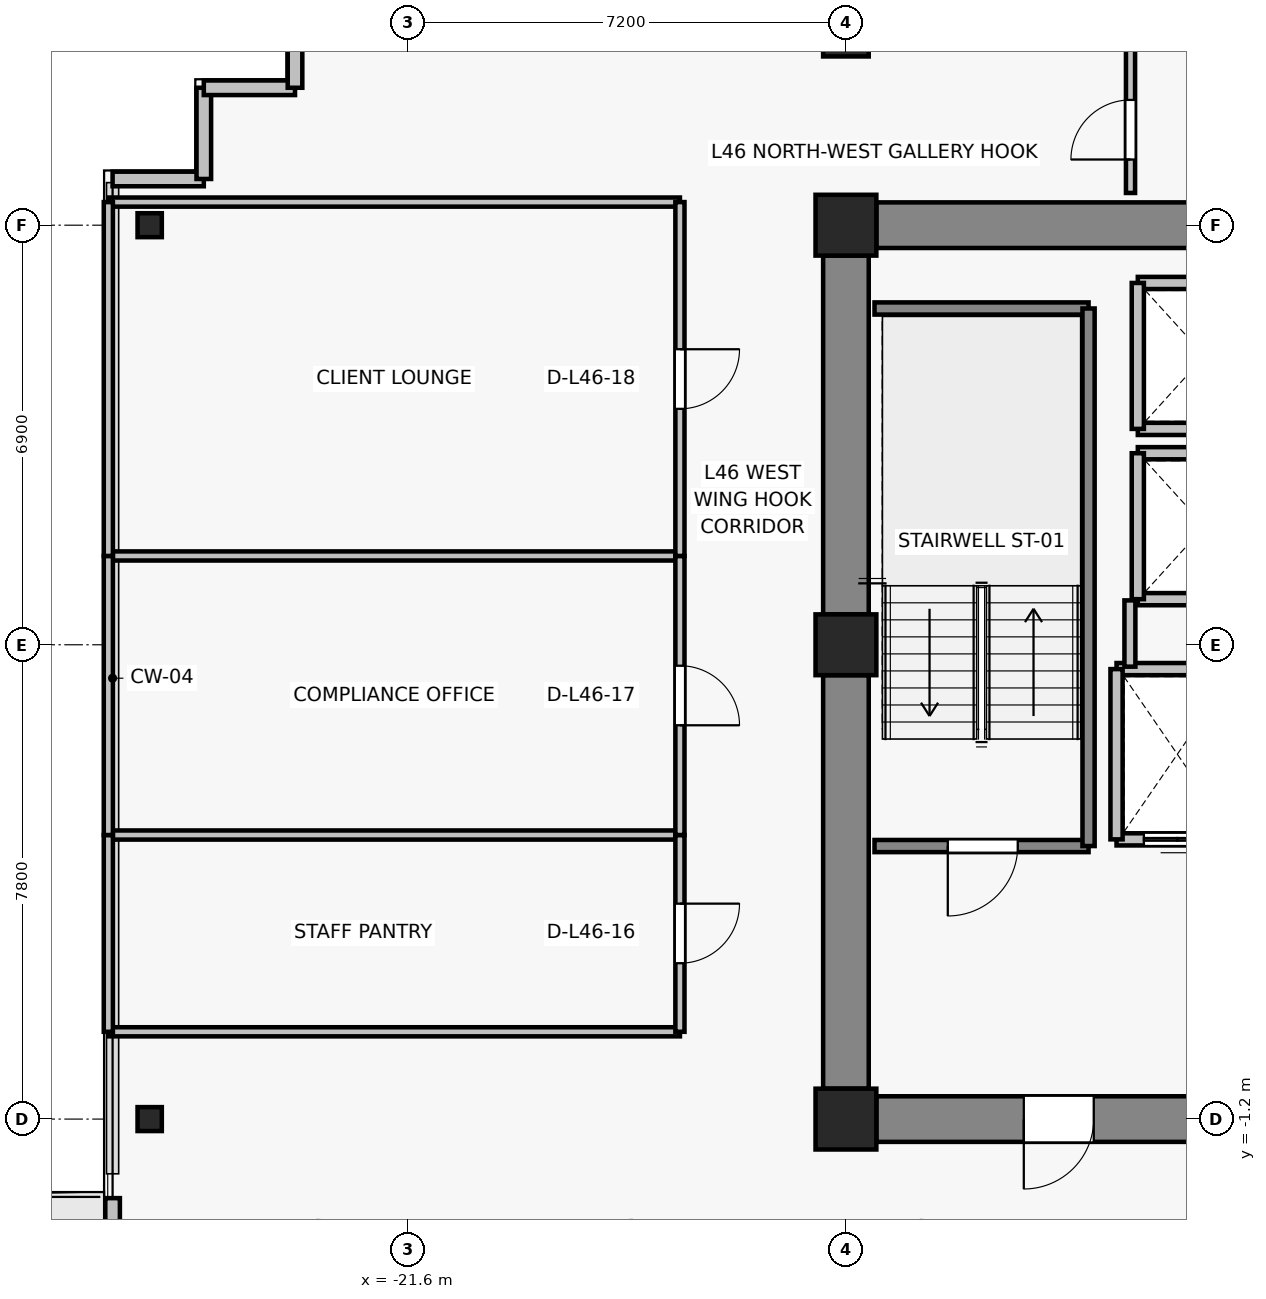
"""IFC4 building model, lengths in metres.
Left out: names, types, materials, properties, quantities, classifications, styles, units other than length and angle.
Written with IfcOpenShell. Run it as: python <this file> out.ifc"""

import sys

from ifc_helpers import new_model, si_unit, direction, frame, frame_2d, origin, origin_2d, place, context, subcontext, project, spatial, rectangle, i_section, extrude, source, transform, mapped, element, fill, save


model = new_model("IFC4")
c1 = context("Model", 3, precision=1e-05, world=origin(), true_north=direction((0.0, 1.0)))
c2 = subcontext(c1, "Body", "Model", "MODEL_VIEW")
j1 = project(units=[si_unit("LENGTHUNIT", "METRE"), si_unit("PLANEANGLEUNIT", "RADIAN")], contexts=[c1])
p1 = place(None, origin())
s1 = spatial("IfcSite", under=j1, at=p1, CompositionType="ELEMENT")
p2 = place(p1, origin())
s2 = spatial("IfcBuilding", under=s1, at=p2, CompositionType="ELEMENT")
p3 = place(p2, frame((0.0, 0.0, 166.0)))
s3 = spatial("IfcBuildingStorey", under=s2, at=p3, CompositionType="ELEMENT", Elevation=166.0)
for number, where, z_axis, x_axis in (
    (1, (-14.4, -1.2, 0.0), (0.0, 0.0, 1.0), (1.0, 0.0, 0.0)),
    (2, (-14.4, 6.6, 0.0), (0.0, 0.0, 1.0), (1.0, 0.0, 0.0)),
    (3, (-14.4, 13.5, 0.0), (0.0, 0.0, 1.0), (1.0, 0.0, 0.0)),
):
    element("IfcColumn", number, at=place(p3, frame(where, z_axis=z_axis, x_axis=x_axis)), inside=s3, PredefinedType="COLUMN", context=c2, shape_type="SweptSolid", body=[
        extrude(rectangle(XDim=1.0, YDim=1.0, at=origin_2d()), origin(), (0.0, 0.0, 1.0), 3.3),
    ])
p4 = place(p3, frame((-14.4, 16.65, 0.0), z_axis=(0.0, 0.0, 1.0), x_axis=(1.0, 0.0, 0.0)))
e4 = element("IfcColumn", 4, at=p4, inside=s3, PredefinedType="COLUMN", context=c2, shape_type="SweptSolid", body=[
    extrude(rectangle(XDim=0.75, YDim=0.75, at=origin_2d()), origin(), (0.0, 0.0, 1.0), 3.3),
])
for number, where, z_axis, x_axis in (
    (5, (-25.85, -1.2, 0.0), (0.0, 0.0, 1.0), (1.0, 0.0, 0.0)),
    (6, (-25.85, 13.5, 0.0), (0.0, 0.0, 1.0), (1.0, 0.0, 0.0)),
):
    element("IfcColumn", number, at=place(p3, frame(where, z_axis=z_axis, x_axis=x_axis)), inside=s3, PredefinedType="COLUMN", context=c2, shape_type="SweptSolid", body=[
        extrude(i_section(OverallWidth=0.399, OverallDepth=0.394, WebThickness=0.023, FlangeThickness=0.037, FilletRadius=0.015, at=origin_2d()), origin(), (0.0, 0.0, 1.0), 3.3),
    ])
p5 = place(p3, frame((-13.9, 13.5, 0.0), z_axis=(0.0, 0.0, 1.0), x_axis=(1.0, 0.0, 0.0)))
e7 = element("IfcWall", 7, at=p5, inside=s3, PredefinedType="SHEAR", context=c2, shape_type="SweptSolid", body=[
    extrude(rectangle(XDim=6.2, YDim=0.75, at=frame_2d((3.1, 0.0))), origin(), (0.0, 0.0, 1.0), 3.075),
])
p6 = place(p3, frame((-14.4, -0.7, 0.0), z_axis=(0.0, 0.0, 1.0), x_axis=(0.0, 1.0, 0.0)))
e8 = element("IfcWall", 8, at=p6, inside=s3, PredefinedType="SHEAR", context=c2, shape_type="SweptSolid", body=[
    extrude(rectangle(XDim=6.8, YDim=0.75, at=frame_2d((3.4, 0.0))), origin(), (0.0, 0.0, 1.0), 3.075),
])
p7 = place(p3, frame((-14.4, 7.1, 0.0), z_axis=(0.0, 0.0, 1.0), x_axis=(0.0, 1.0, 0.0)))
e9 = element("IfcWall", 9, at=p7, inside=s3, PredefinedType="SHEAR", context=c2, shape_type="SweptSolid", body=[
    extrude(rectangle(XDim=5.9, YDim=0.75, at=frame_2d((2.95, 0.0))), origin(), (0.0, 0.0, 1.0), 3.075),
])
p8 = place(p3, frame((-7.7, -1.2, 0.0), z_axis=(0.0, 0.0, 1.0), x_axis=(-1.0, 0.0, 0.0)))
e10 = element("IfcWall", 10, at=p8, inside=s3, PredefinedType="SHEAR", context=c2, shape_type="SweptSolid", body=[
    extrude(rectangle(XDim=6.2, YDim=0.75, at=frame_2d((3.1, 0.0))), origin(), (0.0, 0.0, 1.0), 3.075),
])
p9 = place(p8, frame((2.625, 0.0, 0.0)))
e11 = element("IfcOpeningElement", 11, at=p9, cuts=e10, PredefinedType="OPENING", context=c2, shape_type="SweptSolid", body=[
    extrude(rectangle(XDim=1.15, YDim=2.15, at=frame_2d((0.575, 1.075))), frame((0.0, 0.385, 0.0), z_axis=(0.0, -1.0, 0.0), x_axis=(1.0, 0.0, 0.0)), (0.0, 0.0, 1.0), 0.77),
])
p10 = place(p3, frame((-26.46, -8.3, 0.0), z_axis=(0.0, 0.0, 1.0), x_axis=(0.0, 1.0, 0.0)))
e12 = element("IfcWall", 12, at=p10, inside=s3, PredefinedType="SOLIDWALL", context=c2, shape_type="SweptSolid", body=[
    extrude(rectangle(XDim=5.8, YDim=0.24, at=frame_2d((2.9, 0.0))), origin(), (0.0, 0.0, 1.0), 3.075),
])
p11 = place(p10, frame((1.218, 0.0, 0.0)))
e13 = element("IfcOpeningElement", 13, at=p11, cuts=e12, PredefinedType="OPENING", context=c2, shape_type="SweptSolid", body=[
    extrude(rectangle(XDim=1.0, YDim=2.2, at=frame_2d((0.5, 1.1))), frame((0.0, 0.13, 0.0), z_axis=(0.0, -1.0, 0.0), x_axis=(1.0, 0.0, 0.0)), (0.0, 0.0, 1.0), 0.26),
])
p12 = place(p10, frame((2.568, 0.0, 0.85)))
e14 = element("IfcOpeningElement", 14, at=p12, cuts=e12, PredefinedType="OPENING", context=c2, shape_type="SweptSolid", body=[
    extrude(rectangle(XDim=1.2, YDim=1.5, at=frame_2d((0.6, 0.75))), frame((0.0, 0.13, 0.0), z_axis=(0.0, -1.0, 0.0), x_axis=(1.0, 0.0, 0.0)), (0.0, 0.0, 1.0), 0.26),
])
for number, where, z_axis, x_axis in (
    (15, (-24.96, 14.26, 0.0), (0.0, 0.0, 1.0), (-1.0, 0.0, 0.0)),
    (16, (-24.96, 15.76, 0.0), (0.0, 0.0, 1.0), (0.0, -1.0, 0.0)),
    (17, (-23.46, 15.76, 0.0), (0.0, 0.0, 1.0), (-1.0, 0.0, 0.0)),
    (18, (-23.46, 17.26, 0.0), (0.0, 0.0, 1.0), (0.0, -1.0, 0.0)),
):
    element("IfcWall", number, at=place(p3, frame(where, z_axis=z_axis, x_axis=x_axis)), inside=s3, PredefinedType="SOLIDWALL", context=c2, shape_type="SweptSolid", body=[
        extrude(rectangle(XDim=1.5, YDim=0.24, at=frame_2d((0.75, 0.0))), origin(), (0.0, 0.0, 1.0), 3.075),
    ])
p13 = place(p3, frame((-7.95, 3.4, 0.0), z_axis=(0.0, 0.0, 1.0), x_axis=(-1.0, 0.0, 0.0)))
e19 = element("IfcWall", 19, at=p13, inside=s3, PredefinedType="SOLIDWALL", context=c2, shape_type="SweptSolid", body=[
    extrude(rectangle(XDim=2.0, YDim=0.2, at=frame_2d((1.0, 0.0))), origin(), (0.0, 0.0, 1.0), 3.075),
])
p14 = place(p13, frame((0.45, 0.0, 0.0)))
e20 = element("IfcOpeningElement", 20, at=p14, cuts=e19, PredefinedType="OPENING", context=c2, shape_type="SweptSolid", body=[
    extrude(rectangle(XDim=1.1, YDim=2.2, at=frame_2d((0.55, 1.1))), frame((0.0, 0.11, 0.0), z_axis=(0.0, -1.0, 0.0), x_axis=(1.0, 0.0, 0.0)), (0.0, 0.0, 1.0), 0.22),
])
p15 = place(p3, frame((-9.95, 6.2, 0.0), z_axis=(0.0, 0.0, 1.0), x_axis=(1.0, 0.0, 0.0)))
e21 = element("IfcWall", 21, at=p15, inside=s3, PredefinedType="SOLIDWALL", context=c2, shape_type="SweptSolid", body=[
    extrude(rectangle(XDim=2.0, YDim=0.2, at=frame_2d((1.0, 0.0))), origin(), (0.0, 0.0, 1.0), 3.075),
])
p16 = place(p3, frame((-9.95, 3.4, 0.0), z_axis=(0.0, 0.0, 1.0), x_axis=(0.0, 1.0, 0.0)))
e22 = element("IfcWall", 22, at=p16, inside=s3, PredefinedType="SOLIDWALL", context=c2, shape_type="SweptSolid", body=[
    extrude(rectangle(XDim=2.8, YDim=0.2, at=frame_2d((1.4, 0.0))), origin(), (0.0, 0.0, 1.0), 3.075),
])
for number, where, z_axis, x_axis in (
    (23, (-7.4, 7.35, 0.0), (0.0, 0.0, 1.0), (-1.0, 0.0, 0.0)),
    (24, (-9.6, 9.75, 0.0), (0.0, 0.0, 1.0), (1.0, 0.0, 0.0)),
):
    element("IfcWall", number, at=place(p3, frame(where, z_axis=z_axis, x_axis=x_axis)), inside=s3, PredefinedType="SOLIDWALL", context=c2, shape_type="SweptSolid", body=[
        extrude(rectangle(XDim=2.2, YDim=0.2, at=frame_2d((1.1, 0.0))), origin(), (0.0, 0.0, 1.0), 2.565),
    ])
p17 = place(p3, frame((-9.6, 7.35, 0.0), z_axis=(0.0, 0.0, 1.0), x_axis=(0.0, 1.0, 0.0)))
e25 = element("IfcWall", 25, at=p17, inside=s3, PredefinedType="SOLIDWALL", context=c2, shape_type="SweptSolid", body=[
    extrude(rectangle(XDim=2.4, YDim=0.2, at=frame_2d((1.2, 0.0))), origin(), (0.0, 0.0, 1.0), 3.075),
])
for number, where, z_axis, x_axis in (
    (26, (-7.4, 10.15, 0.0), (0.0, 0.0, 1.0), (-1.0, 0.0, 0.0)),
    (27, (-9.6, 12.55, 0.0), (0.0, 0.0, 1.0), (1.0, 0.0, 0.0)),
):
    element("IfcWall", number, at=place(p3, frame(where, z_axis=z_axis, x_axis=x_axis)), inside=s3, PredefinedType="SOLIDWALL", context=c2, shape_type="SweptSolid", body=[
        extrude(rectangle(XDim=2.2, YDim=0.2, at=frame_2d((1.1, 0.0))), origin(), (0.0, 0.0, 1.0), 2.565),
    ])
p18 = place(p3, frame((-9.6, 10.15, 0.0), z_axis=(0.0, 0.0, 1.0), x_axis=(0.0, 1.0, 0.0)))
e28 = element("IfcWall", 28, at=p18, inside=s3, PredefinedType="SOLIDWALL", context=c2, shape_type="SweptSolid", body=[
    extrude(rectangle(XDim=2.4, YDim=0.2, at=frame_2d((1.2, 0.0))), origin(), (0.0, 0.0, 1.0), 3.075),
])
p19 = place(p3, frame((-10.41, 3.29, 0.0), z_axis=(0.0, 0.0, 1.0), x_axis=(-1.0, 0.0, 0.0)))
e29 = element("IfcWall", 29, at=p19, inside=s3, PredefinedType="SOLIDWALL", context=c2, shape_type="SweptSolid", body=[
    extrude(rectangle(XDim=3.52, YDim=0.2, at=frame_2d((1.76, 0.0))), origin(), (0.0, 0.0, 1.0), 3.075),
])
p20 = place(p19, frame((1.165, 0.0, 0.0)))
e30 = element("IfcOpeningElement", 30, at=p20, cuts=e29, PredefinedType="OPENING", context=c2, shape_type="SweptSolid", body=[
    extrude(rectangle(XDim=1.15, YDim=2.15, at=frame_2d((0.575, 1.075))), frame((0.0, 0.11, 0.0), z_axis=(0.0, -1.0, 0.0), x_axis=(1.0, 0.0, 0.0)), (0.0, 0.0, 1.0), 0.22),
])
p21 = place(p3, frame((-13.93, 12.13, 0.0), z_axis=(0.0, 0.0, 1.0), x_axis=(1.0, 0.0, 0.0)))
e31 = element("IfcWall", 31, at=p21, inside=s3, PredefinedType="SOLIDWALL", context=c2, shape_type="SweptSolid", body=[
    extrude(rectangle(XDim=3.52, YDim=0.2, at=frame_2d((1.76, 0.0))), origin(), (0.0, 0.0, 1.0), 3.075),
])
p22 = place(p3, frame((-10.41, 12.13, 0.0), z_axis=(0.0, 0.0, 1.0), x_axis=(0.0, -1.0, 0.0)))
e32 = element("IfcWall", 32, at=p22, inside=s3, PredefinedType="SOLIDWALL", context=c2, shape_type="SweptSolid", body=[
    extrude(rectangle(XDim=8.84, YDim=0.2, at=frame_2d((4.42, 0.0))), origin(), (0.0, 0.0, 1.0), 3.075),
])
p23 = place(p3, frame((-9.73, 6.24, 0.0), z_axis=(0.0, 0.0, 1.0), x_axis=(0.0, 1.0, 0.0)))
e33 = element("IfcWall", 33, at=p23, inside=s3, PredefinedType="PARTITIONING", context=c2, shape_type="SweptSolid", body=[
    extrude(rectangle(XDim=1.09, YDim=0.18, at=frame_2d((0.545, 0.0))), origin(), (0.0, 0.0, 1.0), 3.075),
])
for number, where, z_axis, x_axis in (
    (34, (-17.13, 0.236, 0.0), (0.0, 0.0, 1.0), (-1.0, 0.0, 0.0)),
    (35, (-26.53, 3.471, 0.0), (0.0, 0.0, 1.0), (1.0, 0.0, 0.0)),
):
    element("IfcWall", number, at=place(p3, frame(where, z_axis=z_axis, x_axis=x_axis)), inside=s3, PredefinedType="PARTITIONING", context=c2, shape_type="SweptSolid", body=[
        extrude(rectangle(XDim=9.4, YDim=0.15, at=frame_2d((4.7, 0.0))), origin(), (0.0, 0.0, 1.0), 2.565),
    ])
p24 = place(p3, frame((-26.53, 0.236, 0.0), z_axis=(0.0, 0.0, 1.0), x_axis=(0.0, 1.0, 0.0)))
e36 = element("IfcWall", 36, at=p24, inside=s3, PredefinedType="PARTITIONING", context=c2, shape_type="SweptSolid", body=[
    extrude(rectangle(XDim=3.236, YDim=0.15, at=frame_2d((1.618, 0.0))), origin(), (0.0, 0.0, 1.0), 3.075),
])
p25 = place(p3, frame((-17.13, 3.471, 0.0), z_axis=(0.0, 0.0, 1.0), x_axis=(0.0, -1.0, 0.0)))
e37 = element("IfcWall", 37, at=p25, inside=s3, PredefinedType="PARTITIONING", context=c2, shape_type="SweptSolid", body=[
    extrude(rectangle(XDim=3.236, YDim=0.15, at=frame_2d((1.618, 0.0))), origin(), (0.0, 0.0, 1.0), 3.075),
])
p26 = place(p25, frame((1.128, 0.0, 0.0)))
e38 = element("IfcOpeningElement", 38, at=p26, cuts=e37, PredefinedType="OPENING", context=c2, shape_type="SweptSolid", body=[
    extrude(rectangle(XDim=0.98, YDim=2.15, at=frame_2d((0.49, 1.075))), frame((0.0, 0.085, 0.0), z_axis=(0.0, -1.0, 0.0), x_axis=(1.0, 0.0, 0.0)), (0.0, 0.0, 1.0), 0.17),
])
p27 = place(p3, frame((-26.53, 8.061, 0.0), z_axis=(0.0, 0.0, 1.0), x_axis=(1.0, 0.0, 0.0)))
e39 = element("IfcWall", 39, at=p27, inside=s3, PredefinedType="PARTITIONING", context=c2, shape_type="SweptSolid", body=[
    extrude(rectangle(XDim=9.4, YDim=0.15, at=frame_2d((4.7, 0.0))), origin(), (0.0, 0.0, 1.0), 2.565),
])
p28 = place(p3, frame((-26.53, 3.471, 0.0), z_axis=(0.0, 0.0, 1.0), x_axis=(0.0, 1.0, 0.0)))
e40 = element("IfcWall", 40, at=p28, inside=s3, PredefinedType="PARTITIONING", context=c2, shape_type="SweptSolid", body=[
    extrude(rectangle(XDim=4.589, YDim=0.15, at=frame_2d((2.295, 0.0))), origin(), (0.0, 0.0, 1.0), 3.075),
])
p29 = place(p3, frame((-17.13, 8.061, 0.0), z_axis=(0.0, 0.0, 1.0), x_axis=(0.0, -1.0, 0.0)))
e41 = element("IfcWall", 41, at=p29, inside=s3, PredefinedType="PARTITIONING", context=c2, shape_type="SweptSolid", body=[
    extrude(rectangle(XDim=4.589, YDim=0.15, at=frame_2d((2.295, 0.0))), origin(), (0.0, 0.0, 1.0), 3.075),
])
p30 = place(p29, frame((1.804, 0.0, 0.0)))
e42 = element("IfcOpeningElement", 42, at=p30, cuts=e41, PredefinedType="OPENING", context=c2, shape_type="SweptSolid", body=[
    extrude(rectangle(XDim=0.98, YDim=2.15, at=frame_2d((0.49, 1.075))), frame((0.0, 0.085, 0.0), z_axis=(0.0, -1.0, 0.0), x_axis=(1.0, 0.0, 0.0)), (0.0, 0.0, 1.0), 0.17),
])
p31 = place(p3, frame((-26.53, 13.88, 0.0), z_axis=(0.0, 0.0, 1.0), x_axis=(1.0, 0.0, 0.0)))
e43 = element("IfcWall", 43, at=p31, inside=s3, PredefinedType="PARTITIONING", context=c2, shape_type="SweptSolid", body=[
    extrude(rectangle(XDim=9.4, YDim=0.15, at=frame_2d((4.7, 0.0))), origin(), (0.0, 0.0, 1.0), 3.075),
])
p32 = place(p3, frame((-26.53, 8.061, 0.0), z_axis=(0.0, 0.0, 1.0), x_axis=(0.0, 1.0, 0.0)))
e44 = element("IfcWall", 44, at=p32, inside=s3, PredefinedType="PARTITIONING", context=c2, shape_type="SweptSolid", body=[
    extrude(rectangle(XDim=5.819, YDim=0.15, at=frame_2d((2.91, 0.0))), origin(), (0.0, 0.0, 1.0), 3.075),
])
p33 = place(p3, frame((-17.13, 13.88, 0.0), z_axis=(0.0, 0.0, 1.0), x_axis=(0.0, -1.0, 0.0)))
e45 = element("IfcWall", 45, at=p33, inside=s3, PredefinedType="PARTITIONING", context=c2, shape_type="SweptSolid", body=[
    extrude(rectangle(XDim=5.819, YDim=0.15, at=frame_2d((2.91, 0.0))), origin(), (0.0, 0.0, 1.0), 2.565),
])
p34 = place(p33, frame((2.42, 0.0, 0.0)))
e46 = element("IfcOpeningElement", 46, at=p34, cuts=e45, PredefinedType="OPENING", context=c2, shape_type="SweptSolid", body=[
    extrude(rectangle(XDim=0.98, YDim=2.15, at=frame_2d((0.49, 1.075))), frame((0.0, 0.085, 0.0), z_axis=(0.0, -1.0, 0.0), x_axis=(1.0, 0.0, 0.0)), (0.0, 0.0, 1.0), 0.17),
])
p35 = place(p3, frame((-9.72, 14.03, 0.0), z_axis=(0.0, 0.0, 1.0), x_axis=(0.0, 1.0, 0.0)))
e47 = element("IfcWall", 47, at=p35, inside=s3, PredefinedType="PARTITIONING", context=c2, shape_type="SweptSolid", body=[
    extrude(rectangle(XDim=3.3, YDim=0.15, at=frame_2d((1.65, 0.0))), origin(), (0.0, 0.0, 1.0), 2.565),
])
p36 = place(p35, frame((0.55, 0.0, 0.0)))
e48 = element("IfcOpeningElement", 48, at=p36, cuts=e47, PredefinedType="OPENING", context=c2, shape_type="SweptSolid", body=[
    extrude(rectangle(XDim=0.98, YDim=2.15, at=frame_2d((0.49, 1.075))), frame((0.0, 0.085, 0.0), z_axis=(0.0, -1.0, 0.0), x_axis=(1.0, 0.0, 0.0)), (0.0, 0.0, 1.0), 0.17),
])
m1 = source(origin(), c2, "Body", "SweptSolid", [
    extrude(rectangle(XDim=1.1, YDim=2.2, at=frame_2d((0.55, 1.1))), frame((0.0, 0.025, 0.0), z_axis=(0.0, -1.0, 0.0), x_axis=(1.0, 0.0, 0.0)), (0.0, 0.0, 1.0), 0.05),
])
p37 = place(p14, origin())
e49 = element("IfcDoor", 49, at=p37, inside=s3, OperationType="DOUBLE_DOOR_SLIDING", PredefinedType="DOOR", context=c2, shape_type="MappedRepresentation", body=[
    mapped(m1, transform((0.0, 0.0, 0.0), x_axis=(1.0, 0.0, 0.0), y_axis=(0.0, 1.0, 0.0), z_axis=(0.0, 0.0, 1.0), scale=1.0)),
])
fill(e20, e49)
m2 = source(origin(), c2, "Body", "SweptSolid", [
    extrude(rectangle(XDim=1.15, YDim=2.15, at=frame_2d((0.575, 1.075))), frame((0.0, 0.025, 0.0), z_axis=(0.0, -1.0, 0.0), x_axis=(1.0, 0.0, 0.0)), (0.0, 0.0, 1.0), 0.05),
])
p38 = place(p20, origin())
e50 = element("IfcDoor", 50, at=p38, inside=s3, OperationType="SINGLE_SWING_RIGHT", PredefinedType="DOOR", context=c2, shape_type="MappedRepresentation", body=[
    mapped(m2, transform((0.0, 0.0, 0.0), x_axis=(1.0, 0.0, 0.0), y_axis=(0.0, 1.0, 0.0), z_axis=(0.0, 0.0, 1.0), scale=1.0)),
])
fill(e30, e50)
p39 = place(p9, origin())
e51 = element("IfcDoor", 51, at=p39, inside=s3, OperationType="SINGLE_SWING_RIGHT", PredefinedType="DOOR", context=c2, shape_type="MappedRepresentation", body=[
    mapped(m2, transform((0.0, 0.0, 0.0), x_axis=(1.0, 0.0, 0.0), y_axis=(0.0, 1.0, 0.0), z_axis=(0.0, 0.0, 1.0), scale=1.0)),
])
fill(e11, e51)
m3 = source(origin(), c2, "Body", "SweptSolid", [
    extrude(rectangle(XDim=0.98, YDim=2.15, at=frame_2d((0.49, 1.075))), frame((0.0, 0.025, 0.0), z_axis=(0.0, -1.0, 0.0), x_axis=(1.0, 0.0, 0.0)), (0.0, 0.0, 1.0), 0.05),
])
p40 = place(p26, origin())
e52 = element("IfcDoor", 52, at=p40, inside=s3, OperationType="SINGLE_SWING_LEFT", PredefinedType="DOOR", context=c2, shape_type="MappedRepresentation", body=[
    mapped(m3, transform((0.0, 0.0, 0.0), x_axis=(1.0, 0.0, 0.0), y_axis=(0.0, 1.0, 0.0), z_axis=(0.0, 0.0, 1.0), scale=1.0)),
])
fill(e38, e52)
p41 = place(p30, origin())
e53 = element("IfcDoor", 53, at=p41, inside=s3, OperationType="SINGLE_SWING_RIGHT", PredefinedType="DOOR", context=c2, shape_type="MappedRepresentation", body=[
    mapped(m3, transform((0.0, 0.0, 0.0), x_axis=(1.0, 0.0, 0.0), y_axis=(0.0, 1.0, 0.0), z_axis=(0.0, 0.0, 1.0), scale=1.0)),
])
fill(e42, e53)
p42 = place(p34, origin())
e54 = element("IfcDoor", 54, at=p42, inside=s3, OperationType="SINGLE_SWING_LEFT", PredefinedType="DOOR", context=c2, shape_type="MappedRepresentation", body=[
    mapped(m3, transform((0.0, 0.0, 0.0), x_axis=(1.0, 0.0, 0.0), y_axis=(0.0, 1.0, 0.0), z_axis=(0.0, 0.0, 1.0), scale=1.0)),
])
fill(e46, e54)
p43 = place(p36, origin())
e55 = element("IfcDoor", 55, at=p43, inside=s3, OperationType="SINGLE_SWING_LEFT", PredefinedType="DOOR", context=c2, shape_type="MappedRepresentation", body=[
    mapped(m3, transform((0.0, 0.0, 0.0), x_axis=(1.0, 0.0, 0.0), y_axis=(0.0, 1.0, 0.0), z_axis=(0.0, 0.0, 1.0), scale=1.0)),
])
fill(e48, e55)
save(model, sys.argv[1])
